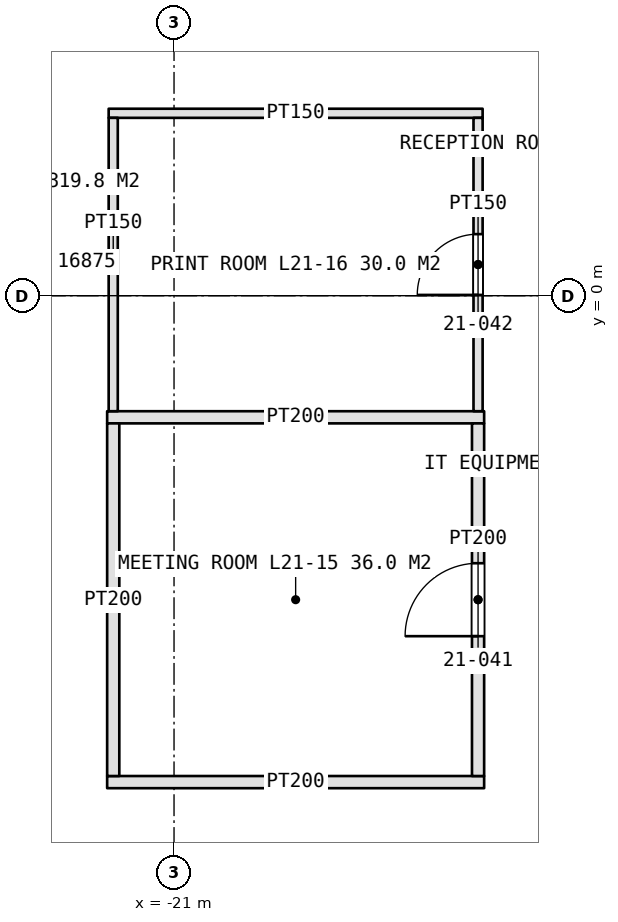
"""IFC4 building model, lengths in metres.
Left out: names, types, materials, properties, quantities, classifications, styles, units other than length and angle.
Written with IfcOpenShell. Run it as: python <this file> out.ifc"""

import sys

from ifc_helpers import new_model, si_unit, direction, frame, frame_2d, origin, place, context, subcontext, project, spatial, rectangle, extrude, element, fill, save


model = new_model("IFC4")
c1 = context("Model", 3, precision=1e-05, world=origin(), true_north=direction((0.0, 1.0)))
c2 = subcontext(c1, "Body", "Model", "MODEL_VIEW")
j1 = project(units=[si_unit("LENGTHUNIT", "METRE"), si_unit("PLANEANGLEUNIT", "RADIAN")], contexts=[c1])
p1 = place(None, origin())
s1 = spatial("IfcSite", under=j1, at=p1, CompositionType="ELEMENT")
p2 = place(p1, origin())
s2 = spatial("IfcBuilding", under=s1, at=p2, CompositionType="ELEMENT")
p3 = place(p2, frame((0.0, 0.0, 105.0)))
s3 = spatial("IfcBuildingStorey", under=s2, at=p3, CompositionType="ELEMENT", Elevation=105.0)
for number, where, z_axis, x_axis in (
    (1, (-15.9, -8.0, 0.0), (0.0, 0.0, 1.0), (-1.0, 0.0, 0.0)),
    (2, (-15.9, -2.0, 0.0), (0.0, 0.0, 1.0), (-1.0, 0.0, 0.0)),
):
    element("IfcWall", number, at=place(p3, frame(where, z_axis=z_axis, x_axis=x_axis)), inside=s3, PredefinedType="PARTITIONING", context=c2, shape_type="SweptSolid", body=[
        extrude(rectangle(XDim=6.2, YDim=0.2, at=frame_2d((3.1, 0.0))), origin(), (0.0, 0.0, 1.0), 3.0),
    ])
p4 = place(p3, frame((-15.925, 3.0, 0.0), z_axis=(0.0, 0.0, 1.0), x_axis=(-1.0, 0.0, 0.0)))
e3 = element("IfcWall", 3, at=p4, inside=s3, PredefinedType="PARTITIONING", context=c2, shape_type="SweptSolid", body=[
    extrude(rectangle(XDim=6.15, YDim=0.15, at=frame_2d((3.075, 0.0))), origin(), (0.0, 0.0, 1.0), 3.0),
])
p5 = place(p3, frame((-16.0, -7.9, 0.0), z_axis=(0.0, 0.0, 1.0), x_axis=(0.0, 1.0, 0.0)))
e4 = element("IfcWall", 4, at=p5, inside=s3, PredefinedType="PARTITIONING", context=c2, shape_type="SweptSolid", body=[
    extrude(rectangle(XDim=5.8, YDim=0.2, at=frame_2d((2.9, 0.0))), origin(), (0.0, 0.0, 1.0), 3.0),
])
p6 = place(p5, frame((2.3, 0.0, 0.0)))
e5 = element("IfcOpeningElement", 5, at=p6, cuts=e4, PredefinedType="OPENING", context=c2, shape_type="SweptSolid", body=[
    extrude(rectangle(XDim=1.2, YDim=2.4, at=frame_2d((0.6, 1.2))), frame((0.0, 0.11, 0.0), z_axis=(0.0, -1.0, 0.0), x_axis=(1.0, 0.0, 0.0)), (0.0, 0.0, 1.0), 0.22),
])
p7 = place(p3, frame((-22.0, -7.9, 0.0), z_axis=(0.0, 0.0, 1.0), x_axis=(0.0, 1.0, 0.0)))
e6 = element("IfcWall", 6, at=p7, inside=s3, PredefinedType="PARTITIONING", context=c2, shape_type="SweptSolid", body=[
    extrude(rectangle(XDim=5.8, YDim=0.2, at=frame_2d((2.9, 0.0))), origin(), (0.0, 0.0, 1.0), 3.0),
])
p8 = place(p3, frame((-16.0, -1.9, 0.0), z_axis=(0.0, 0.0, 1.0), x_axis=(0.0, 1.0, 0.0)))
e7 = element("IfcWall", 7, at=p8, inside=s3, PredefinedType="PARTITIONING", context=c2, shape_type="SweptSolid", body=[
    extrude(rectangle(XDim=4.825, YDim=0.15, at=frame_2d((2.413, 0.0))), origin(), (0.0, 0.0, 1.0), 3.0),
])
p9 = place(p8, frame((1.913, 0.0, 0.0)))
e8 = element("IfcOpeningElement", 8, at=p9, cuts=e7, PredefinedType="OPENING", context=c2, shape_type="SweptSolid", body=[
    extrude(rectangle(XDim=1.0, YDim=2.2, at=frame_2d((0.5, 1.1))), frame((0.0, 0.085, 0.0), z_axis=(0.0, -1.0, 0.0), x_axis=(1.0, 0.0, 0.0)), (0.0, 0.0, 1.0), 0.17),
])
p10 = place(p3, frame((-22.0, -1.9, 0.0), z_axis=(0.0, 0.0, 1.0), x_axis=(0.0, 1.0, 0.0)))
e9 = element("IfcWall", 9, at=p10, inside=s3, PredefinedType="PARTITIONING", context=c2, shape_type="SweptSolid", body=[
    extrude(rectangle(XDim=4.825, YDim=0.15, at=frame_2d((2.413, 0.0))), origin(), (0.0, 0.0, 1.0), 3.0),
])
p11 = place(p6, origin())
e10 = element("IfcDoor", 10, at=p11, inside=s3, OperationType="SINGLE_SWING_LEFT", PredefinedType="DOOR", context=c2, shape_type="SweptSolid", body=[
    extrude(rectangle(XDim=1.2, YDim=2.4, at=frame_2d((0.6, 1.2))), frame((0.0, 0.025, 0.0), z_axis=(0.0, -1.0, 0.0), x_axis=(1.0, 0.0, 0.0)), (0.0, 0.0, 1.0), 0.05),
])
fill(e5, e10)
p12 = place(p9, origin())
e11 = element("IfcDoor", 11, at=p12, inside=s3, OperationType="SINGLE_SWING_LEFT", PredefinedType="DOOR", context=c2, shape_type="SweptSolid", body=[
    extrude(rectangle(XDim=1.0, YDim=2.2, at=frame_2d((0.5, 1.1))), frame((0.0, 0.025, 0.0), z_axis=(0.0, -1.0, 0.0), x_axis=(1.0, 0.0, 0.0)), (0.0, 0.0, 1.0), 0.05),
])
fill(e8, e11)
save(model, sys.argv[1])
